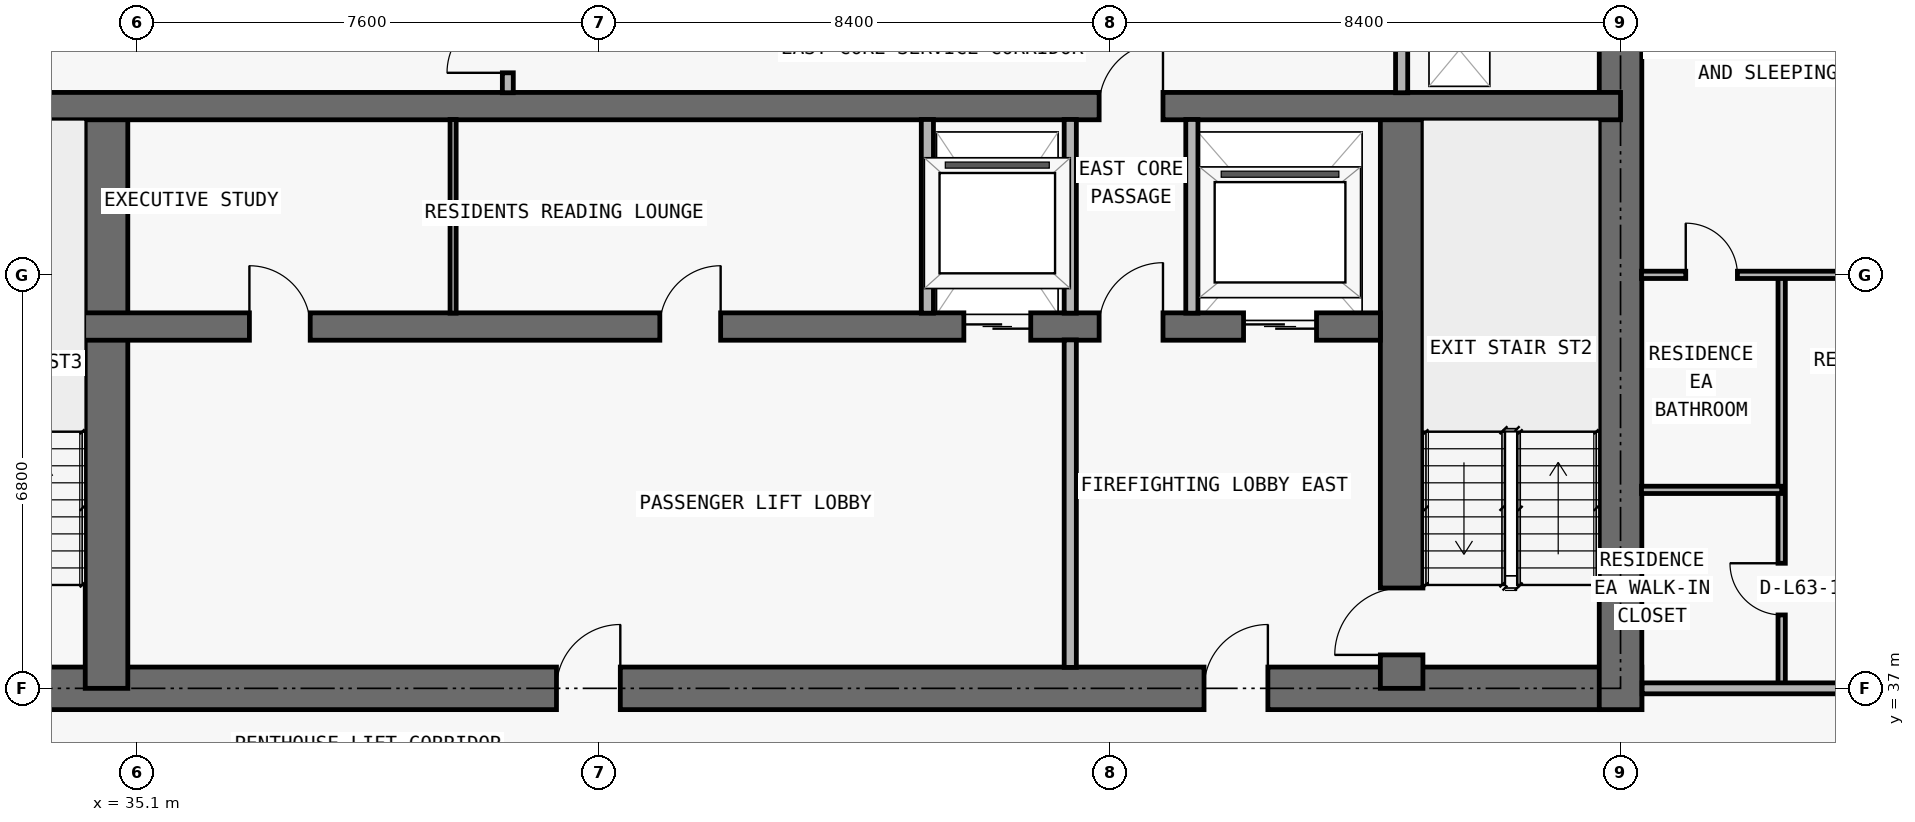
"""IFC4 building model, lengths in metres.
Left out: names, types, materials, properties, quantities, classifications, styles, units other than length and angle.
Written with IfcOpenShell. Run it as: python <this file> out.ifc"""

import sys

from ifc_helpers import new_model, si_unit, direction, frame, frame_2d, origin, place, context, subcontext, project, spatial, rectangle, extrude, element, fill, save


model = new_model("IFC4")
c1 = context("Model", 3, precision=1e-05, world=origin(), true_north=direction((0.0, 1.0)))
c2 = subcontext(c1, "Body", "Model", "MODEL_VIEW")
j1 = project(units=[si_unit("LENGTHUNIT", "METRE"), si_unit("PLANEANGLEUNIT", "RADIAN")], contexts=[c1])
p1 = place(None, origin())
s1 = spatial("IfcSite", under=j1, at=p1, CompositionType="ELEMENT")
p2 = place(p1, origin())
s2 = spatial("IfcBuilding", under=s1, at=p2, CompositionType="ELEMENT")
p3 = place(p2, frame((0.0, 0.0, 226.5)))
s3 = spatial("IfcBuildingStorey", under=s2, at=p3, CompositionType="ELEMENT", Elevation=226.5)
p4 = place(p3, frame((17.95, 37.0, 0.0), z_axis=(0.0, 0.0, 1.0), x_axis=(1.0, 0.0, 0.0)))
e1 = element("IfcWall", 1, at=p4, inside=s3, PredefinedType="SHEAR", context=c2, shape_type="SweptSolid", body=[
    extrude(rectangle(XDim=41.9, YDim=0.7, at=frame_2d((20.95, 0.0))), origin(), (0.0, 0.0, 1.0), 3.05),
])
p5 = place(p4, frame((14.35, 0.0, 0.0)))
e2 = element("IfcOpeningElement", 2, at=p5, cuts=e1, PredefinedType="OPENING", context=c2, shape_type="SweptSolid", body=[
    extrude(rectangle(XDim=1.1, YDim=2.15, at=frame_2d((0.55, 1.075))), frame((0.0, 0.36, 0.0), z_axis=(0.0, -1.0, 0.0), x_axis=(1.0, 0.0, 0.0)), (0.0, 0.0, 1.0), 0.72),
])
p6 = place(p4, frame((6.2, 0.0, 0.0)))
e3 = element("IfcOpeningElement", 3, at=p6, cuts=e1, PredefinedType="OPENING", context=c2, shape_type="SweptSolid", body=[
    extrude(rectangle(XDim=1.05, YDim=2.15, at=frame_2d((0.525, 1.075))), frame((0.0, 0.36, 0.0), z_axis=(0.0, -1.0, 0.0), x_axis=(1.0, 0.0, 0.0)), (0.0, 0.0, 1.0), 0.72),
])
p7 = place(p4, frame((34.7, 0.0, 0.0)))
e4 = element("IfcOpeningElement", 4, at=p7, cuts=e1, PredefinedType="OPENING", context=c2, shape_type="SweptSolid", body=[
    extrude(rectangle(XDim=1.05, YDim=2.15, at=frame_2d((0.525, 1.075))), frame((0.0, 0.36, 0.0), z_axis=(0.0, -1.0, 0.0), x_axis=(1.0, 0.0, 0.0)), (0.0, 0.0, 1.0), 0.72),
])
p8 = place(p4, frame((10.812, 0.0, 0.0)))
e5 = element("IfcOpeningElement", 5, at=p8, cuts=e1, PredefinedType="OPENING", context=c2, shape_type="SweptSolid", body=[
    extrude(rectangle(XDim=1.05, YDim=2.15, at=frame_2d((0.525, 1.075))), frame((0.0, 0.36, 0.0), z_axis=(0.0, -1.0, 0.0), x_axis=(1.0, 0.0, 0.0)), (0.0, 0.0, 1.0), 0.72),
])
p9 = place(p4, frame((24.05, 0.0, 0.0)))
e6 = element("IfcOpeningElement", 6, at=p9, cuts=e1, PredefinedType="OPENING", context=c2, shape_type="SweptSolid", body=[
    extrude(rectangle(XDim=1.05, YDim=2.15, at=frame_2d((0.525, 1.075))), frame((0.0, 0.36, 0.0), z_axis=(0.0, -1.0, 0.0), x_axis=(1.0, 0.0, 0.0)), (0.0, 0.0, 1.0), 0.72),
])
p10 = place(p3, frame((59.5, 36.65, 0.0), z_axis=(0.0, 0.0, 1.0), x_axis=(0.0, 1.0, 0.0)))
e7 = element("IfcWall", 7, at=p10, inside=s3, PredefinedType="SHEAR", context=c2, shape_type="SweptSolid", body=[
    extrude(rectangle(XDim=13.95, YDim=0.7, at=frame_2d((6.975, 0.0))), origin(), (0.0, 0.0, 1.0), 3.05),
])
p11 = place(p3, frame((55.9, 37.0, 0.0), z_axis=(0.0, 0.0, 1.0), x_axis=(0.0, 1.0, 0.0)))
e8 = element("IfcWall", 8, at=p11, inside=s3, PredefinedType="SHEAR", context=c2, shape_type="SweptSolid", body=[
    extrude(rectangle(XDim=9.575, YDim=0.7, at=frame_2d((4.788, 0.0))), origin(), (0.0, 0.0, 1.0), 3.05),
])
p12 = place(p11, frame((0.55, 0.0, 0.0)))
e9 = element("IfcOpeningElement", 9, at=p12, cuts=e8, PredefinedType="OPENING", context=c2, shape_type="SweptSolid", body=[
    extrude(rectangle(XDim=1.1, YDim=2.15, at=frame_2d((0.55, 1.075))), frame((0.0, 0.36, 0.0), z_axis=(0.0, -1.0, 0.0), x_axis=(1.0, 0.0, 0.0)), (0.0, 0.0, 1.0), 0.72),
])
p13 = place(p3, frame((34.6, 37.0, 0.0), z_axis=(0.0, 0.0, 1.0), x_axis=(0.0, 1.0, 0.0)))
e10 = element("IfcWall", 10, at=p13, inside=s3, PredefinedType="SHEAR", context=c2, shape_type="SweptSolid", body=[
    extrude(rectangle(XDim=9.575, YDim=0.7, at=frame_2d((4.788, 0.0))), origin(), (0.0, 0.0, 1.0), 3.05),
])
p14 = place(p3, frame((22.25, 42.95, 0.0), z_axis=(0.0, 0.0, 1.0), x_axis=(1.0, 0.0, 0.0)))
e11 = element("IfcWall", 11, at=p14, inside=s3, PredefinedType="SHEAR", context=c2, shape_type="SweptSolid", body=[
    extrude(rectangle(XDim=33.3, YDim=0.45, at=frame_2d((16.65, 0.0))), origin(), (0.0, 0.0, 1.0), 3.05),
])
p15 = place(p14, frame((1.05, 0.0, 0.0)))
e12 = element("IfcOpeningElement", 12, at=p15, cuts=e11, PredefinedType="OPENING", context=c2, shape_type="SweptSolid", body=[
    extrude(rectangle(XDim=1.2, YDim=2.2, at=frame_2d((0.6, 1.1))), frame((0.0, 0.235, 0.0), z_axis=(0.0, -1.0, 0.0), x_axis=(1.0, 0.0, 0.0)), (0.0, 0.0, 1.0), 0.47),
])
p16 = place(p14, frame((31.05, 0.0, 0.0)))
e13 = element("IfcOpeningElement", 13, at=p16, cuts=e11, PredefinedType="OPENING", context=c2, shape_type="SweptSolid", body=[
    extrude(rectangle(XDim=1.2, YDim=2.2, at=frame_2d((0.6, 1.1))), frame((0.0, 0.235, 0.0), z_axis=(0.0, -1.0, 0.0), x_axis=(1.0, 0.0, 0.0)), (0.0, 0.0, 1.0), 0.47),
])
p17 = place(p14, frame((26.45, 0.0, 0.0)))
e14 = element("IfcOpeningElement", 14, at=p17, cuts=e11, PredefinedType="OPENING", context=c2, shape_type="SweptSolid", body=[
    extrude(rectangle(XDim=1.1, YDim=2.2, at=frame_2d((0.55, 1.1))), frame((0.0, 0.235, 0.0), z_axis=(0.0, -1.0, 0.0), x_axis=(1.0, 0.0, 0.0)), (0.0, 0.0, 1.0), 0.47),
])
p18 = place(p14, frame((5.95, 0.0, 0.0)))
e15 = element("IfcOpeningElement", 15, at=p18, cuts=e11, PredefinedType="OPENING", context=c2, shape_type="SweptSolid", body=[
    extrude(rectangle(XDim=1.1, YDim=2.2, at=frame_2d((0.55, 1.1))), frame((0.0, 0.235, 0.0), z_axis=(0.0, -1.0, 0.0), x_axis=(1.0, 0.0, 0.0)), (0.0, 0.0, 1.0), 0.47),
])
p19 = place(p14, frame((3.625, 0.0, 0.0)))
e16 = element("IfcOpeningElement", 16, at=p19, cuts=e11, PredefinedType="OPENING", context=c2, shape_type="SweptSolid", body=[
    extrude(rectangle(XDim=1.05, YDim=2.15, at=frame_2d((0.525, 1.075))), frame((0.0, 0.235, 0.0), z_axis=(0.0, -1.0, 0.0), x_axis=(1.0, 0.0, 0.0)), (0.0, 0.0, 1.0), 0.47),
])
p20 = place(p14, frame((28.675, 0.0, 0.0)))
e17 = element("IfcOpeningElement", 17, at=p20, cuts=e11, PredefinedType="OPENING", context=c2, shape_type="SweptSolid", body=[
    extrude(rectangle(XDim=1.05, YDim=2.15, at=frame_2d((0.525, 1.075))), frame((0.0, 0.235, 0.0), z_axis=(0.0, -1.0, 0.0), x_axis=(1.0, 0.0, 0.0)), (0.0, 0.0, 1.0), 0.47),
])
p21 = place(p14, frame((14.7, 0.0, 0.0)))
e18 = element("IfcOpeningElement", 18, at=p21, cuts=e11, PredefinedType="OPENING", context=c2, shape_type="SweptSolid", body=[
    extrude(rectangle(XDim=1.0, YDim=2.2, at=frame_2d((0.5, 1.1))), frame((0.0, 0.235, 0.0), z_axis=(0.0, -1.0, 0.0), x_axis=(1.0, 0.0, 0.0)), (0.0, 0.0, 1.0), 0.47),
])
p22 = place(p14, frame((21.45, 0.0, 0.0)))
e19 = element("IfcOpeningElement", 19, at=p22, cuts=e11, PredefinedType="OPENING", context=c2, shape_type="SweptSolid", body=[
    extrude(rectangle(XDim=1.0, YDim=2.2, at=frame_2d((0.5, 1.1))), frame((0.0, 0.235, 0.0), z_axis=(0.0, -1.0, 0.0), x_axis=(1.0, 0.0, 0.0)), (0.0, 0.0, 1.0), 0.47),
])
p23 = place(p3, frame((18.3, 46.575, 0.0), z_axis=(0.0, 0.0, 1.0), x_axis=(1.0, 0.0, 0.0)))
e20 = element("IfcWall", 20, at=p23, inside=s3, PredefinedType="SHEAR", context=c2, shape_type="SweptSolid", body=[
    extrude(rectangle(XDim=41.2, YDim=0.45, at=frame_2d((20.6, 0.0))), origin(), (0.0, 0.0, 1.0), 3.05),
])
p24 = place(p23, frame((7.6, 0.0, 0.0)))
e21 = element("IfcOpeningElement", 21, at=p24, cuts=e20, PredefinedType="OPENING", context=c2, shape_type="SweptSolid", body=[
    extrude(rectangle(XDim=1.0, YDim=2.2, at=frame_2d((0.5, 1.1))), frame((0.0, 0.235, 0.0), z_axis=(0.0, -1.0, 0.0), x_axis=(1.0, 0.0, 0.0)), (0.0, 0.0, 1.0), 0.47),
])
p25 = place(p23, frame((32.625, 0.0, 0.0)))
e22 = element("IfcOpeningElement", 22, at=p25, cuts=e20, PredefinedType="OPENING", context=c2, shape_type="SweptSolid", body=[
    extrude(rectangle(XDim=1.05, YDim=2.15, at=frame_2d((0.525, 1.075))), frame((0.0, 0.235, 0.0), z_axis=(0.0, -1.0, 0.0), x_axis=(1.0, 0.0, 0.0)), (0.0, 0.0, 1.0), 0.47),
])
p26 = place(p3, frame((40.3, 43.17, 0.0), z_axis=(0.0, 0.0, 1.0), x_axis=(0.0, 1.0, 0.0)))
e23 = element("IfcWall", 23, at=p26, inside=s3, PredefinedType="MOVABLE", context=c2, shape_type="SweptSolid", body=[
    extrude(rectangle(XDim=3.185, YDim=0.1, at=frame_2d((1.593, 0.0))), origin(), (0.0, 0.0, 1.0), 3.05),
])
p27 = place(p3, frame((41.2, 46.795, 0.0), z_axis=(0.0, 0.0, 1.0), x_axis=(0.0, 1.0, 0.0)))
e24 = element("IfcWall", 24, at=p27, inside=s3, PredefinedType="PARTITIONING", context=c2, shape_type="SweptSolid", body=[
    extrude(rectangle(XDim=3.16, YDim=0.18, at=frame_2d((1.58, 0.0))), origin(), (0.0, 0.0, 1.0), 3.05),
])
p28 = place(p27, frame((0.327, 0.0, 0.0)))
e25 = element("IfcOpeningElement", 25, at=p28, cuts=e24, PredefinedType="OPENING", context=c2, shape_type="SweptSolid", body=[
    extrude(rectangle(XDim=1.0, YDim=2.2, at=frame_2d((0.5, 1.1))), frame((0.0, 0.1, 0.0), z_axis=(0.0, -1.0, 0.0), x_axis=(1.0, 0.0, 0.0)), (0.0, 0.0, 1.0), 0.2),
])
p29 = place(p3, frame((48.1, 43.17, 0.0), z_axis=(0.0, 0.0, 1.0), x_axis=(0.0, 1.0, 0.0)))
e26 = element("IfcWall", 26, at=p29, inside=s3, PredefinedType="PARTITIONING", context=c2, shape_type="SweptSolid", body=[
    extrude(rectangle(XDim=3.185, YDim=0.2, at=frame_2d((1.593, 0.0))), origin(), (0.0, 0.0, 1.0), 3.05),
])
p30 = place(p3, frame((50.45, 37.345, 0.0), z_axis=(0.0, 0.0, 1.0), x_axis=(0.0, 1.0, 0.0)))
e27 = element("IfcWall", 27, at=p30, inside=s3, PredefinedType="PARTITIONING", context=c2, shape_type="SweptSolid", body=[
    extrude(rectangle(XDim=5.385, YDim=0.2, at=frame_2d((2.692, 0.0))), origin(), (0.0, 0.0, 1.0), 3.05),
])
for number, where, z_axis, x_axis in (
    (28, (50.45, 43.17, 0.0), (0.0, 0.0, 1.0), (0.0, 1.0, 0.0)),
    (29, (52.45, 43.17, 0.0), (0.0, 0.0, 1.0), (0.0, 1.0, 0.0)),
):
    element("IfcWall", number, at=place(p3, frame(where, z_axis=z_axis, x_axis=x_axis)), inside=s3, PredefinedType="PARTITIONING", context=c2, shape_type="SweptSolid", body=[
        extrude(rectangle(XDim=3.185, YDim=0.2, at=frame_2d((1.593, 0.0))), origin(), (0.0, 0.0, 1.0), 3.05),
    ])
p31 = place(p3, frame((55.9, 46.795, 0.0), z_axis=(0.0, 0.0, 1.0), x_axis=(0.0, 1.0, 0.0)))
e30 = element("IfcWall", 30, at=p31, inside=s3, PredefinedType="PARTITIONING", context=c2, shape_type="SweptSolid", body=[
    extrude(rectangle(XDim=3.16, YDim=0.2, at=frame_2d((1.58, 0.0))), origin(), (0.0, 0.0, 1.0), 3.05),
])
p32 = place(p3, frame((62.15, 37.0, 0.0), z_axis=(0.0, 0.0, 1.0), x_axis=(0.0, 1.0, 0.0)))
e31 = element("IfcWall", 31, at=p32, inside=s3, PredefinedType="PARTITIONING", context=c2, shape_type="SweptSolid", body=[
    extrude(rectangle(XDim=6.8, YDim=0.12, at=frame_2d((3.4, 0.0))), origin(), (0.0, 0.0, 1.0), 3.05),
])
p33 = place(p32, frame((1.207, 0.0, 0.0)))
e32 = element("IfcOpeningElement", 32, at=p33, cuts=e31, PredefinedType="OPENING", context=c2, shape_type="SweptSolid", body=[
    extrude(rectangle(XDim=0.85, YDim=2.1, at=frame_2d((0.425, 1.05))), frame((0.0, 0.07, 0.0), z_axis=(0.0, -1.0, 0.0), x_axis=(1.0, 0.0, 0.0)), (0.0, 0.0, 1.0), 0.14),
])
p34 = place(p3, frame((59.855, 37.0, 0.0), z_axis=(0.0, 0.0, 1.0), x_axis=(1.0, 0.0, 0.0)))
e33 = element("IfcWall", 33, at=p34, inside=s3, PredefinedType="PARTITIONING", context=c2, shape_type="SweptSolid", body=[
    extrude(rectangle(XDim=5.845, YDim=0.18, at=frame_2d((2.922, 0.0))), origin(), (0.0, 0.0, 1.0), 3.05),
])
p35 = place(p34, frame((3.57, 0.0, 0.0)))
e34 = element("IfcOpeningElement", 34, at=p35, cuts=e33, PredefinedType="OPENING", context=c2, shape_type="SweptSolid", body=[
    extrude(rectangle(XDim=1.0, YDim=2.2, at=frame_2d((0.5, 1.1))), frame((0.0, 0.1, 0.0), z_axis=(0.0, -1.0, 0.0), x_axis=(1.0, 0.0, 0.0)), (0.0, 0.0, 1.0), 0.2),
])
p36 = place(p3, frame((59.845, 40.264, 0.0), z_axis=(0.0, 0.0, 1.0), x_axis=(1.0, 0.0, 0.0)))
e35 = element("IfcWall", 35, at=p36, inside=s3, PredefinedType="PARTITIONING", context=c2, shape_type="SweptSolid", body=[
    extrude(rectangle(XDim=2.305, YDim=0.12, at=frame_2d((1.152, 0.0))), origin(), (0.0, 0.0, 1.0), 3.05),
])
p37 = place(p3, frame((59.845, 43.8, 0.0), z_axis=(0.0, 0.0, 1.0), x_axis=(1.0, 0.0, 0.0)))
e36 = element("IfcWall", 36, at=p37, inside=s3, PredefinedType="PARTITIONING", context=c2, shape_type="SweptSolid", body=[
    extrude(rectangle(XDim=9.56, YDim=0.12, at=frame_2d((4.78, 0.0))), origin(), (0.0, 0.0, 1.0), 2.418),
])
p38 = place(p37, frame((3.63, 0.0, 0.0)))
e37 = element("IfcOpeningElement", 37, at=p38, cuts=e36, PredefinedType="OPENING", context=c2, shape_type="SweptSolid", body=[
    extrude(rectangle(XDim=0.9, YDim=2.15, at=frame_2d((0.45, 1.075))), frame((0.0, 0.07, 0.0), z_axis=(0.0, -1.0, 0.0), x_axis=(1.0, 0.0, 0.0)), (0.0, 0.0, 1.0), 0.14),
])
p39 = place(p37, frame((0.728, 0.0, 0.0)))
e38 = element("IfcOpeningElement", 38, at=p39, cuts=e36, PredefinedType="OPENING", context=c2, shape_type="SweptSolid", body=[
    extrude(rectangle(XDim=0.85, YDim=2.1, at=frame_2d((0.425, 1.05))), frame((0.0, 0.07, 0.0), z_axis=(0.0, -1.0, 0.0), x_axis=(1.0, 0.0, 0.0)), (0.0, 0.0, 1.0), 0.14),
])
p40 = place(p16, origin())
e39 = element("IfcDoor", 39, at=p40, inside=s3, OperationType="DOUBLE_DOOR_SLIDING", PredefinedType="DOOR", context=c2, shape_type="SweptSolid", body=[
    extrude(rectangle(XDim=1.2, YDim=2.2, at=frame_2d((0.6, 1.1))), frame((0.0, 0.025, 0.0), z_axis=(0.0, -1.0, 0.0), x_axis=(1.0, 0.0, 0.0)), (0.0, 0.0, 1.0), 0.05),
])
fill(e13, e39)
p41 = place(p17, origin())
e40 = element("IfcDoor", 40, at=p41, inside=s3, OperationType="DOUBLE_DOOR_SLIDING", PredefinedType="DOOR", context=c2, shape_type="SweptSolid", body=[
    extrude(rectangle(XDim=1.1, YDim=2.2, at=frame_2d((0.55, 1.1))), frame((0.0, 0.025, 0.0), z_axis=(0.0, -1.0, 0.0), x_axis=(1.0, 0.0, 0.0)), (0.0, 0.0, 1.0), 0.05),
])
fill(e14, e40)
p42 = place(p7, origin())
e41 = element("IfcDoor", 41, at=p42, inside=s3, OperationType="SINGLE_SWING_RIGHT", PredefinedType="DOOR", context=c2, shape_type="SweptSolid", body=[
    extrude(rectangle(XDim=1.05, YDim=2.15, at=frame_2d((0.525, 1.075))), frame((0.0, 0.025, 0.0), z_axis=(0.0, -1.0, 0.0), x_axis=(1.0, 0.0, 0.0)), (0.0, 0.0, 1.0), 0.05),
])
fill(e4, e41)
p43 = place(p12, origin())
e42 = element("IfcDoor", 42, at=p43, inside=s3, OperationType="SINGLE_SWING_LEFT", PredefinedType="DOOR", context=c2, shape_type="SweptSolid", body=[
    extrude(rectangle(XDim=1.1, YDim=2.15, at=frame_2d((0.55, 1.075))), frame((0.0, 0.025, 0.0), z_axis=(0.0, -1.0, 0.0), x_axis=(1.0, 0.0, 0.0)), (0.0, 0.0, 1.0), 0.05),
])
fill(e9, e42)
p44 = place(p20, origin())
e43 = element("IfcDoor", 43, at=p44, inside=s3, OperationType="SINGLE_SWING_RIGHT", PredefinedType="DOOR", context=c2, shape_type="SweptSolid", body=[
    extrude(rectangle(XDim=1.05, YDim=2.15, at=frame_2d((0.525, 1.075))), frame((0.0, 0.025, 0.0), z_axis=(0.0, -1.0, 0.0), x_axis=(1.0, 0.0, 0.0)), (0.0, 0.0, 1.0), 0.05),
])
fill(e17, e43)
p45 = place(p9, origin())
e44 = element("IfcDoor", 44, at=p45, inside=s3, OperationType="SINGLE_SWING_RIGHT", PredefinedType="DOOR", context=c2, shape_type="SweptSolid", body=[
    extrude(rectangle(XDim=1.05, YDim=2.15, at=frame_2d((0.525, 1.075))), frame((0.0, 0.025, 0.0), z_axis=(0.0, -1.0, 0.0), x_axis=(1.0, 0.0, 0.0)), (0.0, 0.0, 1.0), 0.05),
])
fill(e6, e44)
p46 = place(p21, origin())
e45 = element("IfcDoor", 45, at=p46, inside=s3, OperationType="SINGLE_SWING_LEFT", PredefinedType="DOOR", context=c2, shape_type="SweptSolid", body=[
    extrude(rectangle(XDim=1.0, YDim=2.2, at=frame_2d((0.5, 1.1))), frame((0.0, 0.025, 0.0), z_axis=(0.0, -1.0, 0.0), x_axis=(1.0, 0.0, 0.0)), (0.0, 0.0, 1.0), 0.05),
])
fill(e18, e45)
p47 = place(p22, origin())
e46 = element("IfcDoor", 46, at=p47, inside=s3, OperationType="SINGLE_SWING_RIGHT", PredefinedType="DOOR", context=c2, shape_type="SweptSolid", body=[
    extrude(rectangle(XDim=1.0, YDim=2.2, at=frame_2d((0.5, 1.1))), frame((0.0, 0.025, 0.0), z_axis=(0.0, -1.0, 0.0), x_axis=(1.0, 0.0, 0.0)), (0.0, 0.0, 1.0), 0.05),
])
fill(e19, e46)
p48 = place(p25, origin())
e47 = element("IfcDoor", 47, at=p48, inside=s3, OperationType="SINGLE_SWING_RIGHT", PredefinedType="DOOR", context=c2, shape_type="SweptSolid", body=[
    extrude(rectangle(XDim=1.05, YDim=2.15, at=frame_2d((0.525, 1.075))), frame((0.0, 0.025, 0.0), z_axis=(0.0, -1.0, 0.0), x_axis=(1.0, 0.0, 0.0)), (0.0, 0.0, 1.0), 0.05),
])
fill(e22, e47)
p49 = place(p28, origin())
e48 = element("IfcDoor", 48, at=p49, inside=s3, OperationType="SINGLE_SWING_LEFT", PredefinedType="DOOR", context=c2, shape_type="SweptSolid", body=[
    extrude(rectangle(XDim=1.0, YDim=2.2, at=frame_2d((0.5, 1.1))), frame((0.0, 0.025, 0.0), z_axis=(0.0, -1.0, 0.0), x_axis=(1.0, 0.0, 0.0)), (0.0, 0.0, 1.0), 0.05),
])
fill(e25, e48)
p50 = place(p33, origin())
e49 = element("IfcDoor", 49, at=p50, inside=s3, OperationType="SINGLE_SWING_RIGHT", PredefinedType="DOOR", context=c2, shape_type="SweptSolid", body=[
    extrude(rectangle(XDim=0.85, YDim=2.1, at=frame_2d((0.425, 1.05))), frame((0.0, 0.025, 0.0), z_axis=(0.0, -1.0, 0.0), x_axis=(1.0, 0.0, 0.0)), (0.0, 0.0, 1.0), 0.05),
])
fill(e32, e49)
p51 = place(p39, origin())
e50 = element("IfcDoor", 50, at=p51, inside=s3, OperationType="SINGLE_SWING_LEFT", PredefinedType="DOOR", context=c2, shape_type="SweptSolid", body=[
    extrude(rectangle(XDim=0.85, YDim=2.1, at=frame_2d((0.425, 1.05))), frame((0.0, 0.025, 0.0), z_axis=(0.0, -1.0, 0.0), x_axis=(1.0, 0.0, 0.0)), (0.0, 0.0, 1.0), 0.05),
])
fill(e38, e50)
save(model, sys.argv[1])
